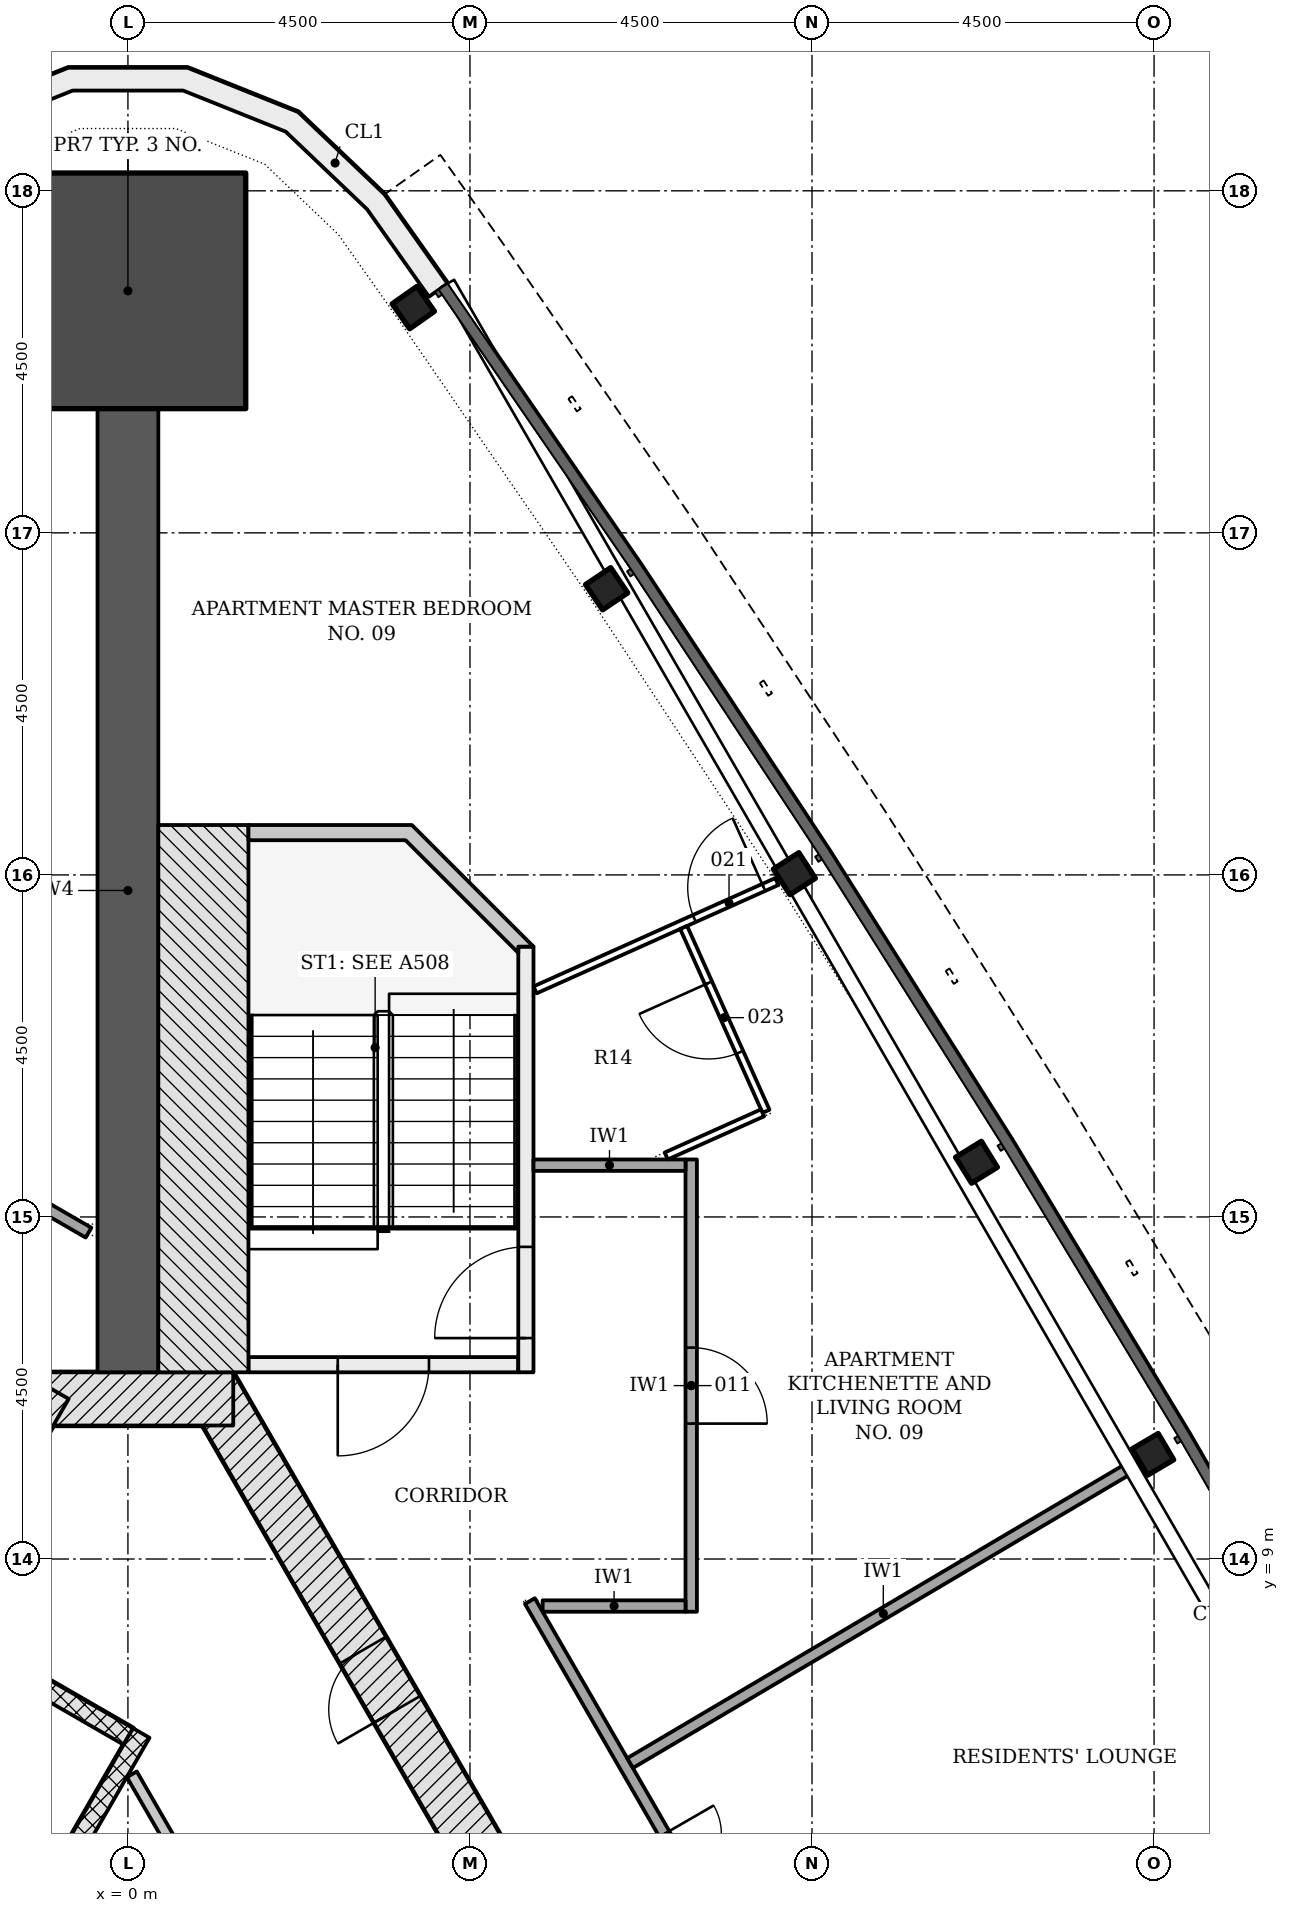
"""IFC4 building model, lengths in metres.
Left out: names, types, materials, properties, quantities, classifications, styles, units other than length and angle.
Written with IfcOpenShell. Run it as: python <this file> out.ifc"""

import sys

from ifc_helpers import new_model, si_unit, direction, frame, frame_2d, origin, origin_2d, place, context, subcontext, project, spatial, polyline, rectangle, i_section, outline, extrude, element, fill, save


model = new_model("IFC4")
c1 = context("Model", 3, precision=1e-05, world=origin(), true_north=direction((0.0, 1.0)))
c2 = subcontext(c1, "Body", "Model", "MODEL_VIEW")
j1 = project(units=[si_unit("LENGTHUNIT", "METRE"), si_unit("PLANEANGLEUNIT", "RADIAN")], contexts=[c1])
p1 = place(None, origin())
s1 = spatial("IfcSite", under=j1, at=p1, CompositionType="ELEMENT")
p2 = place(p1, origin())
s2 = spatial("IfcBuilding", under=s1, at=p2, CompositionType="ELEMENT")
p3 = place(p2, frame((0.0, 0.0, 91.5)))
s3 = spatial("IfcBuildingStorey", under=s2, at=p3, CompositionType="ELEMENT", Elevation=91.5)
p4 = place(p3, frame((10.311, -4.703, -0.2), z_axis=(0.0, 0.0, 1.0), x_axis=(-0.500001446645, 0.866024568562, 0.0)))
e1 = element("IfcWall", 1, at=p4, inside=s3, PredefinedType="SHEAR", context=c2, shape_type="SweptSolid", body=[
    extrude(rectangle(XDim=18.458, YDim=0.7, at=frame_2d((9.229, 0.0))), origin(), (0.0, 0.0, 1.0), 3.6),
])
p5 = place(p4, frame((8.7, 0.0, 0.2)))
e2 = element("IfcOpeningElement", 2, at=p5, cuts=e1, PredefinedType="OPENING", context=c2, shape_type="SweptSolid", body=[
    extrude(rectangle(XDim=1.0, YDim=2.1, at=frame_2d((0.5, 1.05))), frame((0.0, 0.36, 0.0), z_axis=(0.0, -1.0, 0.0), x_axis=(1.0, 0.0, 0.0)), (0.0, 0.0, 1.0), 0.72),
])
p6 = place(p4, frame((3.99, 0.0, 0.2)))
e3 = element("IfcOpeningElement", 3, at=p6, cuts=e1, PredefinedType="OPENING", context=c2, shape_type="SweptSolid", body=[
    extrude(rectangle(XDim=0.9, YDim=2.1, at=frame_2d((0.45, 1.05))), frame((0.0, 0.36, 0.0), z_axis=(0.0, -1.0, 0.0), x_axis=(1.0, 0.0, 0.0)), (0.0, 0.0, 1.0), 0.72),
])
p7 = place(p4, frame((13.539, 0.0, 0.2)))
e4 = element("IfcOpeningElement", 4, at=p7, cuts=e1, PredefinedType="OPENING", context=c2, shape_type="SweptSolid", body=[
    extrude(rectangle(XDim=0.9, YDim=2.1, at=frame_2d((0.45, 1.05))), frame((0.0, 0.36, 0.0), z_axis=(0.0, -1.0, 0.0), x_axis=(1.0, 0.0, 0.0)), (0.0, 0.0, 1.0), 0.72),
])
p8 = place(p3, frame((1.386, 11.106, -0.2), z_axis=(0.0, 0.0, 1.0), x_axis=(-1.0, 0.0, 0.0)))
e5 = element("IfcWall", 5, at=p8, inside=s3, PredefinedType="SHEAR", context=c2, shape_type="SweptSolid", body=[
    extrude(rectangle(XDim=2.771, YDim=0.7, at=frame_2d((1.386, 0.0))), origin(), (0.0, 0.0, 1.0), 3.6),
])
p9 = place(p3, frame((-1.083, 11.281, -0.2), z_axis=(0.0, 0.0, 1.0), x_axis=(-0.500001446645, -0.866024568562, 0.0)))
e6 = element("IfcWall", 6, at=p9, inside=s3, PredefinedType="SHEAR", context=c2, shape_type="SweptSolid", body=[
    extrude(rectangle(XDim=18.458, YDim=0.7, at=frame_2d((9.229, 0.0))), origin(), (0.0, 0.0, 1.0), 3.6),
])
p10 = place(p9, frame((8.979, 0.0, 0.2)))
e7 = element("IfcOpeningElement", 7, at=p10, cuts=e6, PredefinedType="OPENING", context=c2, shape_type="SweptSolid", body=[
    extrude(rectangle(XDim=1.2, YDim=2.1, at=frame_2d((0.6, 1.05))), frame((0.0, 0.36, 0.0), z_axis=(0.0, -1.0, 0.0), x_axis=(1.0, 0.0, 0.0)), (0.0, 0.0, 1.0), 0.72),
])
p11 = place(p9, frame((11.029, 0.0, 0.2)))
e8 = element("IfcOpeningElement", 8, at=p11, cuts=e6, PredefinedType="OPENING", context=c2, shape_type="SweptSolid", body=[
    extrude(rectangle(XDim=1.2, YDim=2.1, at=frame_2d((0.6, 1.05))), frame((0.0, 0.36, 0.0), z_axis=(0.0, -1.0, 0.0), x_axis=(1.0, 0.0, 0.0)), (0.0, 0.0, 1.0), 0.72),
])
p12 = place(p3, frame((0.0, 11.456, -0.2), z_axis=(0.0, 0.0, 1.0), x_axis=(0.0, 1.0, 0.0)))
e9 = element("IfcWall", 9, at=p12, inside=s3, PredefinedType="SHEAR", context=c2, shape_type="SweptSolid", body=[
    extrude(rectangle(XDim=12.678, YDim=0.8, at=frame_2d((6.339, 0.0))), origin(), (0.0, 0.0, 1.0), 3.6),
])
p13 = place(p3, frame((0.0, 25.684, -0.2), z_axis=(0.0, 0.0, 1.0), x_axis=(0.0, 1.0, 0.0)))
e10 = element("IfcColumn", 10, at=p13, inside=s3, PredefinedType="COLUMN", context=c2, shape_type="SweptSolid", body=[
    extrude(rectangle(XDim=3.1, YDim=3.1, at=origin_2d()), origin(), (0.0, 0.0, 1.0), 3.6),
])
for number, where, z_axis, x_axis in (
    (11, (13.484, 10.377, -0.2), (0.0, 0.0, 1.0), (-0.508, 0.861, 0.0)),
    (12, (11.164, 14.22, -0.2), (0.0, 0.0, 1.0), (-0.525, 0.851, 0.0)),
    (13, (8.768, 18.016, -0.2), (0.0, 0.0, 1.0), (-0.542, 0.84, 0.0)),
    (14, (6.298, 21.765, -0.2), (0.0, 0.0, 1.0), (-0.558, 0.83, 0.0)),
    (15, (3.755, 25.464, -0.2), (0.0, 0.0, 1.0), (-0.575, 0.818, 0.0)),
):
    element("IfcColumn", number, at=place(p3, frame(where, z_axis=z_axis, x_axis=x_axis)), inside=s3, PredefinedType="COLUMN", context=c2, shape_type="SweptSolid", body=[
        extrude(i_section(OverallWidth=0.401, OverallDepth=0.399, WebThickness=0.025, FlangeThickness=0.04, FilletRadius=0.015, at=origin_2d()), origin(), (0.0, 0.0, 1.0), 3.6),
    ])
p14 = place(p3, origin())
e16 = element("IfcWall", 16, at=p14, inside=s3, PredefinedType="NOTDEFINED", context=c2, shape_type="SweptSolid", body=[
    extrude(outline(polyline([(4.205, 25.78), (3.375, 26.953), (2.24, 28.035), (0.784, 28.619), (-0.784, 28.619), (-2.24, 28.035), (-3.375, 26.953), (-3.168, 26.736), (-2.075, 27.779), (-0.727, 28.319), (0.727, 28.319), (2.075, 27.779), (3.147, 26.756), (3.96, 25.606), (4.205, 25.78)])), origin(), (0.0, 0.0, 1.0), 3.3),
])
p15 = place(p3, frame((-2.506, 8.115, -0.2), z_axis=(0.0, 0.0, 1.0), x_axis=(0.865996321171, -0.50005036918, 0.0)))
e17 = element("IfcWall", 17, at=p15, inside=s3, PredefinedType="PARTITIONING", context=c2, shape_type="SweptSolid", body=[
    extrude(rectangle(XDim=2.9, YDim=0.25, at=frame_2d((1.45, 0.0))), origin(), (0.0, 0.0, 1.0), 3.6),
])
p16 = place(p3, frame((0.176, 6.711, 0.0), z_axis=(0.0, 0.0, 1.0), x_axis=(-0.500004227369, -0.866022963098, 0.0)))
e18 = element("IfcWall", 18, at=p16, inside=s3, PredefinedType="PARTITIONING", context=c2, shape_type="SweptSolid", body=[
    extrude(rectangle(XDim=11.8, YDim=0.25, at=frame_2d((5.9, 0.0))), origin(), (0.0, 0.0, 1.0), 3.4),
])
p17 = place(p3, frame((2.174, 2.492, 0.0), z_axis=(0.0, 0.0, 1.0), x_axis=(-0.499999641798, 0.866025610592, 0.0)))
e19 = element("IfcWall", 19, at=p17, inside=s3, PredefinedType="PARTITIONING", context=c2, shape_type="SweptSolid", body=[
    extrude(rectangle(XDim=4.244, YDim=0.15, at=frame_2d((2.122, 0.0))), origin(), (0.0, 0.0, 1.0), 3.4),
])
p18 = place(p3, frame((5.135, 11.556, -0.2), z_axis=(0.0, 0.0, 1.0), x_axis=(-1.0, 0.0, 0.0)))
e20 = element("IfcWall", 20, at=p18, inside=s3, PredefinedType="SHEAR", context=c2, shape_type="SweptSolid", body=[
    extrude(rectangle(XDim=3.55, YDim=0.2, at=frame_2d((1.775, 0.0))), origin(), (0.0, 0.0, 1.0), 3.6),
])
p19 = place(p18, frame((1.175, 0.0, 0.2)))
e21 = element("IfcOpeningElement", 21, at=p19, cuts=e20, PredefinedType="OPENING", context=c2, shape_type="SweptSolid", body=[
    extrude(rectangle(XDim=1.2, YDim=2.1, at=frame_2d((0.6, 1.05))), frame((0.0, 0.11, 0.0), z_axis=(0.0, -1.0, 0.0), x_axis=(1.0, 0.0, 0.0)), (0.0, 0.0, 1.0), 0.22),
])
p20 = place(p3, frame((5.236, 11.456, -0.2), z_axis=(0.0, 0.0, 1.0), x_axis=(0.0, 1.0, 0.0)))
e22 = element("IfcWall", 22, at=p20, inside=s3, PredefinedType="SHEAR", context=c2, shape_type="SweptSolid", body=[
    extrude(rectangle(XDim=5.6, YDim=0.2, at=frame_2d((2.8, 0.0))), origin(), (0.0, 0.0, 1.0), 3.6),
])
p21 = place(p20, frame((0.45, 0.0, 0.2)))
e23 = element("IfcOpeningElement", 23, at=p21, cuts=e22, PredefinedType="OPENING", context=c2, shape_type="SweptSolid", body=[
    extrude(rectangle(XDim=1.2, YDim=2.1, at=frame_2d((0.6, 1.05))), frame((0.0, 0.11, 0.0), z_axis=(0.0, -1.0, 0.0), x_axis=(1.0, 0.0, 0.0)), (0.0, 0.0, 1.0), 0.22),
])
p22 = place(p3, frame((0.993, 11.456, -0.2), z_axis=(0.0, 0.0, 1.0), x_axis=(0.0, 1.0, 0.0)))
e24 = element("IfcWall", 24, at=p22, inside=s3, PredefinedType="SHEAR", context=c2, shape_type="SweptSolid", body=[
    extrude(rectangle(XDim=7.2, YDim=1.186, at=frame_2d((3.6, 0.0))), origin(), (0.0, 0.0, 1.0), 3.6),
])
p23 = place(p3, frame((0.0, 0.0, -0.2)))
e25 = element("IfcWall", 25, at=p23, inside=s3, PredefinedType="SHEAR", context=c2, shape_type="SweptSolid", body=[
    extrude(outline(polyline([(5.336, 17.056), (3.736, 18.656), (1.586, 18.656), (1.586, 18.456), (3.653, 18.456), (5.135, 16.974), (5.135, 17.056), (5.135, 17.056), (5.135, 17.056), (5.135, 17.056), (5.135, 17.056), (5.135, 17.056), (5.135, 17.056), (5.135, 17.056), (5.135, 17.056), (5.135, 17.056), (5.135, 17.056), (5.135, 17.056), (5.135, 17.056), (5.135, 17.056), (5.135, 17.056), (5.135, 17.056), (5.135, 17.056), (5.336, 17.056)])), origin(), (0.0, 0.0, 1.0), 3.6),
])
p24 = place(p3, frame((5.289, 8.446, 0.0), z_axis=(0.0, 0.0, 1.0), x_axis=(0.499996620721, -0.866027354803, 0.0)))
e26 = element("IfcWall", 26, at=p24, inside=s3, PredefinedType="PARTITIONING", context=c2, shape_type="SweptSolid", body=[
    extrude(rectangle(XDim=15.057, YDim=0.15, at=frame_2d((7.528, 0.0))), origin(), (0.0, 0.0, 1.0), 2.778),
])
p25 = place(p24, frame((12.566, 0.0, 0.0)))
e27 = element("IfcOpeningElement", 27, at=p25, cuts=e26, PredefinedType="OPENING", context=c2, shape_type="SweptSolid", body=[
    extrude(rectangle(XDim=1.0, YDim=2.1, at=frame_2d((0.5, 1.05))), frame((0.0, 0.085, 0.0), z_axis=(0.0, -1.0, 0.0), x_axis=(1.0, 0.0, 0.0)), (0.0, 0.0, 1.0), 0.17),
])
p26 = place(p24, frame((9.395, 0.0, 0.0)))
e28 = element("IfcOpeningElement", 28, at=p26, cuts=e26, PredefinedType="OPENING", context=c2, shape_type="SweptSolid", body=[
    extrude(rectangle(XDim=1.0, YDim=2.1, at=frame_2d((0.5, 1.05))), frame((0.0, 0.085, 0.0), z_axis=(0.0, -1.0, 0.0), x_axis=(1.0, 0.0, 0.0)), (0.0, 0.0, 1.0), 0.17),
])
p27 = place(p24, frame((6.845, 0.0, 0.0)))
e29 = element("IfcOpeningElement", 29, at=p27, cuts=e26, PredefinedType="OPENING", context=c2, shape_type="SweptSolid", body=[
    extrude(rectangle(XDim=1.0, YDim=2.1, at=frame_2d((0.5, 1.05))), frame((0.0, 0.085, 0.0), z_axis=(0.0, -1.0, 0.0), x_axis=(1.0, 0.0, 0.0)), (0.0, 0.0, 1.0), 0.17),
])
p28 = place(p24, frame((3.537, 0.0, 0.0)))
e30 = element("IfcOpeningElement", 30, at=p28, cuts=e26, PredefinedType="OPENING", context=c2, shape_type="SweptSolid", body=[
    extrude(rectangle(XDim=1.5, YDim=2.1, at=frame_2d((0.75, 1.05))), frame((0.0, 0.085, 0.0), z_axis=(0.0, -1.0, 0.0), x_axis=(1.0, 0.0, 0.0)), (0.0, 0.0, 1.0), 0.17),
])
p29 = place(p3, frame((7.411, 14.256, 0.0), z_axis=(0.0, 0.0, 1.0), x_axis=(0.0, -1.0, 0.0)))
e31 = element("IfcWall", 31, at=p29, inside=s3, PredefinedType="PARTITIONING", context=c2, shape_type="SweptSolid", body=[
    extrude(rectangle(XDim=5.95, YDim=0.15, at=frame_2d((2.975, 0.0))), origin(), (0.0, 0.0, 1.0), 2.778),
])
p30 = place(p29, frame((2.475, 0.0, 0.0)))
e32 = element("IfcOpeningElement", 32, at=p30, cuts=e31, PredefinedType="OPENING", context=c2, shape_type="SweptSolid", body=[
    extrude(rectangle(XDim=1.0, YDim=2.1, at=frame_2d((0.5, 1.05))), frame((0.0, 0.085, 0.0), z_axis=(0.0, -1.0, 0.0), x_axis=(1.0, 0.0, 0.0)), (0.0, 0.0, 1.0), 0.17),
])
p31 = place(p3, frame((-5.093, 15.935, 0.0), z_axis=(0.0, 0.0, 1.0), x_axis=(0.866033195618, -0.499986503906, 0.0)))
e33 = element("IfcWall", 33, at=p31, inside=s3, PredefinedType="PARTITIONING", context=c2, shape_type="SweptSolid", body=[
    extrude(rectangle(XDim=5.282, YDim=0.15, at=frame_2d((2.641, 0.0))), origin(), (0.0, 0.0, 1.0), 3.4),
])
p32 = place(p31, frame((1.816, 0.0, 0.0)))
e34 = element("IfcOpeningElement", 34, at=p32, cuts=e33, PredefinedType="OPENING", context=c2, shape_type="SweptSolid", body=[
    extrude(rectangle(XDim=1.5, YDim=2.1, at=frame_2d((0.75, 1.05))), frame((0.0, 0.085, 0.0), z_axis=(0.0, -1.0, 0.0), x_axis=(1.0, 0.0, 0.0)), (0.0, 0.0, 1.0), 0.17),
])
p33 = place(p3, frame((5.336, 14.181, 0.0), z_axis=(0.0, 0.0, 1.0), x_axis=(1.0, 0.0, 0.0)))
e35 = element("IfcWall", 35, at=p33, inside=s3, PredefinedType="PARTITIONING", context=c2, shape_type="SweptSolid", body=[
    extrude(rectangle(XDim=2.0, YDim=0.15, at=frame_2d((1.0, 0.0))), origin(), (0.0, 0.0, 1.0), 3.4),
])
p34 = place(p3, frame((5.456, 8.381, 0.0), z_axis=(0.0, 0.0, 1.0), x_axis=(1.0, 0.0, 0.0)))
e36 = element("IfcWall", 36, at=p34, inside=s3, PredefinedType="PARTITIONING", context=c2, shape_type="SweptSolid", body=[
    extrude(rectangle(XDim=1.88, YDim=0.15, at=frame_2d((0.94, 0.0))), origin(), (0.0, 0.0, 1.0), 3.4),
])
p35 = place(p3, frame((13.269, 10.25, 0.0), z_axis=(0.0, 0.0, 1.0), x_axis=(-0.861057776749, -0.508507133775, 0.0)))
e37 = element("IfcWall", 37, at=p35, inside=s3, PredefinedType="PARTITIONING", context=c2, shape_type="SweptSolid", body=[
    extrude(rectangle(XDim=7.738, YDim=0.15, at=frame_2d((3.869, 0.0))), origin(), (0.0, 0.0, 1.0), 2.778),
])
p36 = place(p3, frame((5.356, 16.487, 0.0), z_axis=(0.0, 0.0, 1.0), x_axis=(0.912565214453, 0.408931203713, 0.0)))
e38 = element("IfcWall", 38, at=p36, inside=s3, PredefinedType="PARTITIONING", context=c2, shape_type="SweptSolid", body=[
    extrude(rectangle(XDim=3.485, YDim=0.1, at=frame_2d((1.743, 0.0))), origin(), (0.0, 0.0, 1.0), 2.974),
])
p37 = place(p36, frame((2.297, 0.0, 0.0)))
e39 = element("IfcOpeningElement", 39, at=p37, cuts=e38, PredefinedType="OPENING", context=c2, shape_type="SweptSolid", body=[
    extrude(rectangle(XDim=1.0, YDim=2.1, at=frame_2d((0.5, 1.05))), frame((0.0, 0.06, 0.0), z_axis=(0.0, -1.0, 0.0), x_axis=(1.0, 0.0, 0.0)), (0.0, 0.0, 1.0), 0.12),
])
p38 = place(p3, frame((8.395, 14.89, 0.0), z_axis=(0.0, 0.0, 1.0), x_axis=(-0.408965961138, 0.912549638448, 0.0)))
e40 = element("IfcWall", 40, at=p38, inside=s3, PredefinedType="PARTITIONING", context=c2, shape_type="SweptSolid", body=[
    extrude(rectangle(XDim=2.65, YDim=0.1, at=frame_2d((1.325, 0.0))), origin(), (0.0, 0.0, 1.0), 2.974),
])
p39 = place(p38, frame((0.85, 0.0, 0.0)))
e41 = element("IfcOpeningElement", 41, at=p39, cuts=e40, PredefinedType="OPENING", context=c2, shape_type="SweptSolid", body=[
    extrude(rectangle(XDim=1.0, YDim=2.1, at=frame_2d((0.5, 1.05))), frame((0.0, 0.06, 0.0), z_axis=(0.0, -1.0, 0.0), x_axis=(1.0, 0.0, 0.0)), (0.0, 0.0, 1.0), 0.12),
])
p40 = place(p3, frame((7.082, 14.302, 0.0), z_axis=(0.0, 0.0, 1.0), x_axis=(0.912545530992, 0.408975126221, 0.0)))
e42 = element("IfcWall", 42, at=p40, inside=s3, PredefinedType="PARTITIONING", context=c2, shape_type="SweptSolid", body=[
    extrude(rectangle(XDim=1.388, YDim=0.1, at=frame_2d((0.694, 0.0))), origin(), (0.0, 0.0, 1.0), 3.4),
])
p41 = place(p7, origin())
e43 = element("IfcDoor", 43, at=p41, inside=s3, OperationType="SINGLE_SWING_LEFT", PredefinedType="DOOR", context=c2, shape_type="SweptSolid", body=[
    extrude(rectangle(XDim=0.9, YDim=2.1, at=frame_2d((0.45, 1.05))), frame((0.0, 0.075, 0.0), z_axis=(0.0, -1.0, 0.0), x_axis=(1.0, 0.0, 0.0)), (0.0, 0.0, 1.0), 0.15),
])
fill(e4, e43)
p42 = place(p19, origin())
e44 = element("IfcDoor", 44, at=p42, inside=s3, OperationType="SINGLE_SWING_RIGHT", PredefinedType="DOOR", context=c2, shape_type="SweptSolid", body=[
    extrude(rectangle(XDim=1.2, YDim=2.1, at=frame_2d((0.6, 1.05))), frame((0.0, 0.025, 0.0), z_axis=(0.0, -1.0, 0.0), x_axis=(1.0, 0.0, 0.0)), (0.0, 0.0, 1.0), 0.05),
])
fill(e21, e44)
p43 = place(p21, origin())
e45 = element("IfcDoor", 45, at=p43, inside=s3, OperationType="SINGLE_SWING_LEFT", PredefinedType="DOOR", context=c2, shape_type="SweptSolid", body=[
    extrude(rectangle(XDim=1.2, YDim=2.1, at=frame_2d((0.6, 1.05))), frame((0.0, 0.025, 0.0), z_axis=(0.0, -1.0, 0.0), x_axis=(1.0, 0.0, 0.0)), (0.0, 0.0, 1.0), 0.05),
])
fill(e23, e45)
p44 = place(p28, origin())
e46 = element("IfcDoor", 46, at=p44, inside=s3, OperationType="DOUBLE_DOOR_SINGLE_SWING", PredefinedType="DOOR", context=c2, shape_type="SweptSolid", body=[
    extrude(rectangle(XDim=1.5, YDim=2.1, at=frame_2d((0.75, 1.05))), frame((0.0, 0.025, 0.0), z_axis=(0.0, -1.0, 0.0), x_axis=(1.0, 0.0, 0.0)), (0.0, 0.0, 1.0), 0.05),
])
fill(e30, e46)
p45 = place(p30, origin())
e47 = element("IfcDoor", 47, at=p45, inside=s3, OperationType="SINGLE_SWING_RIGHT", PredefinedType="DOOR", context=c2, shape_type="SweptSolid", body=[
    extrude(rectangle(XDim=1.0, YDim=2.1, at=frame_2d((0.5, 1.05))), frame((0.0, 0.025, 0.0), z_axis=(0.0, -1.0, 0.0), x_axis=(1.0, 0.0, 0.0)), (0.0, 0.0, 1.0), 0.05),
])
fill(e32, e47)
p46 = place(p37, origin())
e48 = element("IfcDoor", 48, at=p46, inside=s3, OperationType="SINGLE_SWING_RIGHT", PredefinedType="DOOR", context=c2, shape_type="SweptSolid", body=[
    extrude(rectangle(XDim=1.0, YDim=2.1, at=frame_2d((0.5, 1.05))), frame((0.0, 0.025, 0.0), z_axis=(0.0, -1.0, 0.0), x_axis=(1.0, 0.0, 0.0)), (0.0, 0.0, 1.0), 0.05),
])
fill(e39, e48)
p47 = place(p39, origin())
e49 = element("IfcDoor", 49, at=p47, inside=s3, OperationType="SINGLE_SWING_RIGHT", PredefinedType="DOOR", context=c2, shape_type="SweptSolid", body=[
    extrude(rectangle(XDim=1.0, YDim=2.1, at=frame_2d((0.5, 1.05))), frame((0.0, 0.025, 0.0), z_axis=(0.0, -1.0, 0.0), x_axis=(1.0, 0.0, 0.0)), (0.0, 0.0, 1.0), 0.05),
])
fill(e41, e49)
save(model, sys.argv[1])
